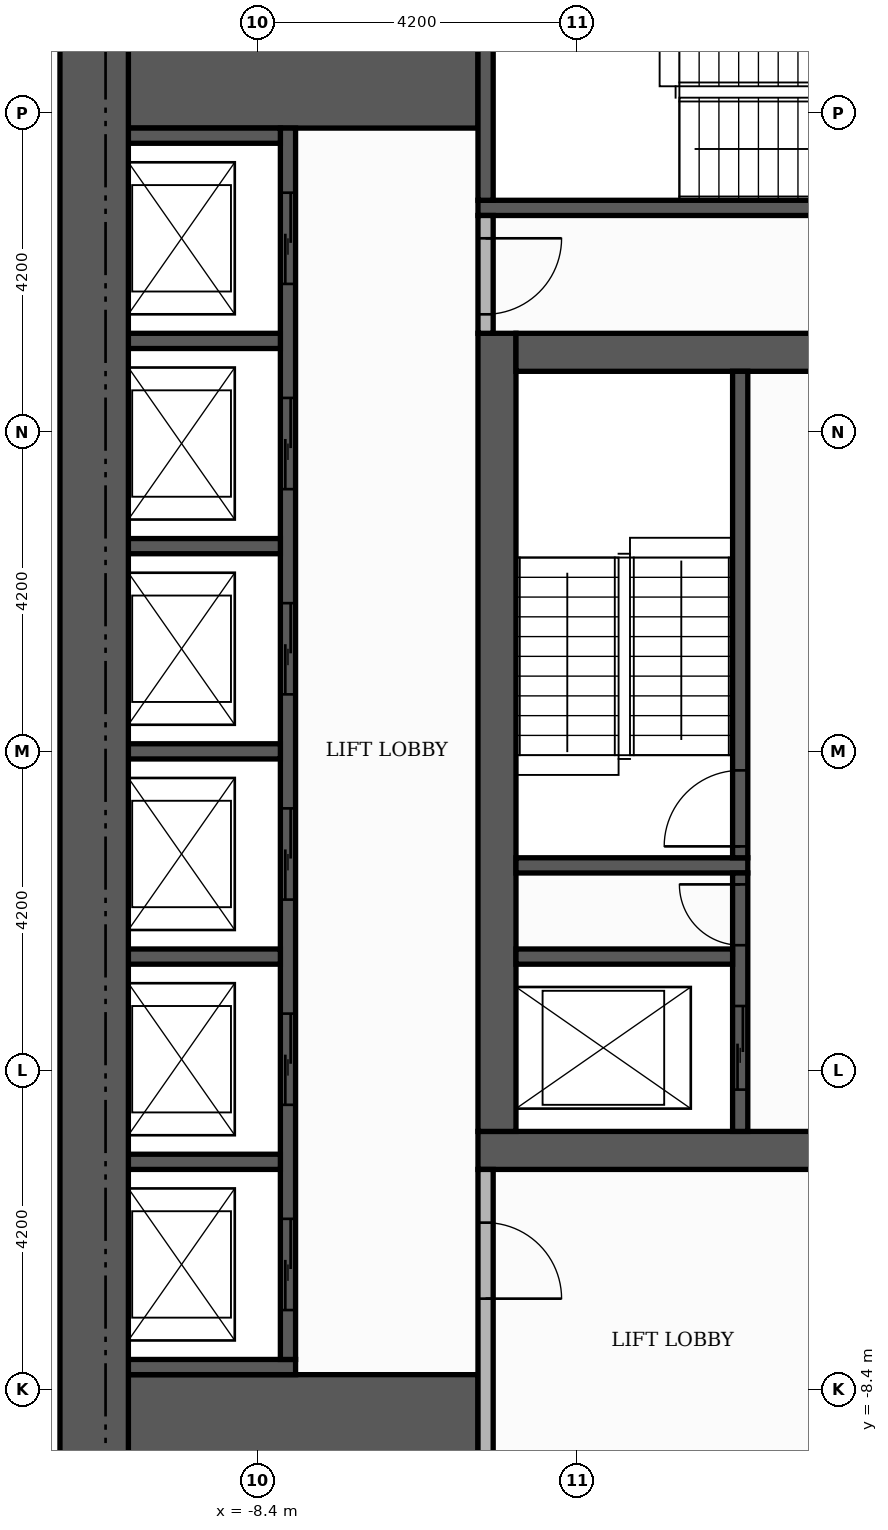
"""IFC4 building model, lengths in metres.
Left out: names, types, materials, properties, quantities, classifications, styles, units other than length and angle.
Written with IfcOpenShell. Run it as: python <this file> out.ifc"""

import sys

from ifc_helpers import new_model, si_unit, direction, frame, frame_2d, origin, place, context, subcontext, project, spatial, rectangle, extrude, element, fill, save


model = new_model("IFC4")
c1 = context("Model", 3, precision=1e-05, world=origin(), true_north=direction((0.0, 1.0)))
c2 = subcontext(c1, "Body", "Model", "MODEL_VIEW")
j1 = project(units=[si_unit("LENGTHUNIT", "METRE"), si_unit("PLANEANGLEUNIT", "RADIAN")], contexts=[c1])
p1 = place(None, origin())
s1 = spatial("IfcSite", under=j1, at=p1, CompositionType="ELEMENT")
p2 = place(p1, origin())
s2 = spatial("IfcBuilding", under=s1, at=p2, CompositionType="ELEMENT")
p3 = place(p2, frame((0.0, 0.0, 83.1)))
s3 = spatial("IfcBuildingStorey", under=s2, at=p3, CompositionType="ELEMENT", Elevation=83.1)
p4 = place(p3, frame((-5.5, -5.25, 0.0), z_axis=(0.0, 0.0, 1.0), x_axis=(1.0, 0.0, 0.0)))
e1 = element("IfcWall", 1, at=p4, inside=s3, PredefinedType="SHEAR", context=c2, shape_type="SweptSolid", body=[
    extrude(rectangle(XDim=11.0, YDim=0.5, at=frame_2d((5.5, 0.0))), origin(), (0.0, 0.0, 1.0), 3.48),
])
p5 = place(p4, frame((4.9, 0.0, 0.0)))
e2 = element("IfcOpeningElement", 2, at=p5, cuts=e1, PredefinedType="OPENING", context=c2, shape_type="SweptSolid", body=[
    extrude(rectangle(XDim=1.2, YDim=2.1, at=frame_2d((0.6, 1.05))), frame((0.0, 0.26, 0.0), z_axis=(0.0, -1.0, 0.0), x_axis=(1.0, 0.0, 0.0)), (0.0, 0.0, 1.0), 0.52),
])
p6 = place(p3, frame((-5.25, -5.0, 0.0), z_axis=(0.0, 0.0, 1.0), x_axis=(0.0, 1.0, 0.0)))
e3 = element("IfcWall", 3, at=p6, inside=s3, PredefinedType="SHEAR", context=c2, shape_type="SweptSolid", body=[
    extrude(rectangle(XDim=10.5, YDim=0.5, at=frame_2d((5.25, 0.0))), origin(), (0.0, 0.0, 1.0), 3.48),
])
p7 = place(p3, frame((-5.0, 5.25, 0.0), z_axis=(0.0, 0.0, 1.0), x_axis=(1.0, 0.0, 0.0)))
e4 = element("IfcWall", 4, at=p7, inside=s3, PredefinedType="SHEAR", context=c2, shape_type="SweptSolid", body=[
    extrude(rectangle(XDim=10.0, YDim=0.5, at=frame_2d((5.0, 0.0))), origin(), (0.0, 0.0, 1.0), 3.48),
])
p8 = place(p7, frame((4.4, 0.0, 0.0)))
e5 = element("IfcOpeningElement", 5, at=p8, cuts=e4, PredefinedType="OPENING", context=c2, shape_type="SweptSolid", body=[
    extrude(rectangle(XDim=1.2, YDim=2.1, at=frame_2d((0.6, 1.05))), frame((0.0, 0.26, 0.0), z_axis=(0.0, -1.0, 0.0), x_axis=(1.0, 0.0, 0.0)), (0.0, 0.0, 1.0), 0.52),
])
for number, where, z_axis, x_axis in (
    (6, (-10.1, -9.15, 0.0), (0.0, 0.0, 1.0), (1.0, 0.0, 0.0)),
    (7, (-10.1, 9.15, 0.0), (0.0, 0.0, 1.0), (1.0, 0.0, 0.0)),
):
    element("IfcWall", number, at=place(p3, frame(where, z_axis=z_axis, x_axis=x_axis)), inside=s3, PredefinedType="SHEAR", context=c2, shape_type="SweptSolid", body=[
        extrude(rectangle(XDim=4.6, YDim=1.9, at=frame_2d((2.3, 0.0))), origin(), (0.0, 0.0, 1.0), 3.48),
    ])
p9 = place(p3, frame((-5.0, -1.5, 0.0), z_axis=(0.0, 0.0, 1.0), x_axis=(1.0, 0.0, 0.0)))
e8 = element("IfcWall", 8, at=p9, inside=s3, PredefinedType="SHEAR", context=c2, shape_type="SweptSolid", body=[
    extrude(rectangle(XDim=3.05, YDim=0.2, at=frame_2d((1.525, 0.0))), origin(), (0.0, 0.0, 1.0), 3.48),
])
p10 = place(p3, frame((-2.05, -1.4, 0.0), z_axis=(0.0, 0.0, 1.0), x_axis=(0.0, 1.0, 0.0)))
e9 = element("IfcWall", 9, at=p10, inside=s3, PredefinedType="SHEAR", context=c2, shape_type="SweptSolid", body=[
    extrude(rectangle(XDim=6.4, YDim=0.2, at=frame_2d((3.2, 0.0))), origin(), (0.0, 0.0, 1.0), 3.48),
])
p11 = place(p10, frame((0.15, 0.0, 0.0)))
e10 = element("IfcOpeningElement", 10, at=p11, cuts=e9, PredefinedType="OPENING", context=c2, shape_type="SweptSolid", body=[
    extrude(rectangle(XDim=1.0, YDim=2.1, at=frame_2d((0.5, 1.05))), frame((0.0, 0.11, 0.0), z_axis=(0.0, -1.0, 0.0), x_axis=(1.0, 0.0, 0.0)), (0.0, 0.0, 1.0), 0.22),
])
p12 = place(p3, frame((-5.5, 7.15, 0.0), z_axis=(0.0, 0.0, 1.0), x_axis=(1.0, 0.0, 0.0)))
e11 = element("IfcWall", 11, at=p12, inside=s3, PredefinedType="SHEAR", context=c2, shape_type="SweptSolid", body=[
    extrude(rectangle(XDim=6.8, YDim=0.2, at=frame_2d((3.4, 0.0))), origin(), (0.0, 0.0, 1.0), 3.48),
])
p13 = place(p3, frame((-5.4, 7.25, 0.0), z_axis=(0.0, 0.0, 1.0), x_axis=(0.0, 1.0, 0.0)))
e12 = element("IfcWall", 12, at=p13, inside=s3, PredefinedType="SHEAR", context=c2, shape_type="SweptSolid", body=[
    extrude(rectangle(XDim=2.85, YDim=0.2, at=frame_2d((1.425, 0.0))), origin(), (0.0, 0.0, 1.0), 3.48),
])
p14 = place(p3, frame((-10.1, -8.1, 0.0), z_axis=(0.0, 0.0, 1.0), x_axis=(1.0, 0.0, 0.0)))
e13 = element("IfcWall", 13, at=p14, inside=s3, PredefinedType="SHEAR", context=c2, shape_type="SweptSolid", body=[
    extrude(rectangle(XDim=2.2, YDim=0.2, at=frame_2d((1.1, 0.0))), origin(), (0.0, 0.0, 1.0), 3.48),
])
p15 = place(p3, frame((-8.0, -8.0, 0.0), z_axis=(0.0, 0.0, 1.0), x_axis=(0.0, 1.0, 0.0)))
e14 = element("IfcWall", 14, at=p15, inside=s3, PredefinedType="SHEAR", context=c2, shape_type="SweptSolid", body=[
    extrude(rectangle(XDim=16.2, YDim=0.2, at=frame_2d((8.1, 0.0))), origin(), (0.0, 0.0, 1.0), 3.48),
])
p16 = place(p15, frame((0.65, 0.0, 0.0)))
e15 = element("IfcOpeningElement", 15, at=p16, cuts=e14, PredefinedType="OPENING", context=c2, shape_type="SweptSolid", body=[
    extrude(rectangle(XDim=1.2, YDim=2.1, at=frame_2d((0.6, 1.05))), frame((0.0, 0.11, 0.0), z_axis=(0.0, -1.0, 0.0), x_axis=(1.0, 0.0, 0.0)), (0.0, 0.0, 1.0), 0.22),
])
p17 = place(p15, frame((3.35, 0.0, 0.0)))
e16 = element("IfcOpeningElement", 16, at=p17, cuts=e14, PredefinedType="OPENING", context=c2, shape_type="SweptSolid", body=[
    extrude(rectangle(XDim=1.2, YDim=2.1, at=frame_2d((0.6, 1.05))), frame((0.0, 0.11, 0.0), z_axis=(0.0, -1.0, 0.0), x_axis=(1.0, 0.0, 0.0)), (0.0, 0.0, 1.0), 0.22),
])
p18 = place(p15, frame((6.05, 0.0, 0.0)))
e17 = element("IfcOpeningElement", 17, at=p18, cuts=e14, PredefinedType="OPENING", context=c2, shape_type="SweptSolid", body=[
    extrude(rectangle(XDim=1.2, YDim=2.1, at=frame_2d((0.6, 1.05))), frame((0.0, 0.11, 0.0), z_axis=(0.0, -1.0, 0.0), x_axis=(1.0, 0.0, 0.0)), (0.0, 0.0, 1.0), 0.22),
])
p19 = place(p15, frame((8.75, 0.0, 0.0)))
e18 = element("IfcOpeningElement", 18, at=p19, cuts=e14, PredefinedType="OPENING", context=c2, shape_type="SweptSolid", body=[
    extrude(rectangle(XDim=1.2, YDim=2.1, at=frame_2d((0.6, 1.05))), frame((0.0, 0.11, 0.0), z_axis=(0.0, -1.0, 0.0), x_axis=(1.0, 0.0, 0.0)), (0.0, 0.0, 1.0), 0.22),
])
p20 = place(p15, frame((11.45, 0.0, 0.0)))
e19 = element("IfcOpeningElement", 19, at=p20, cuts=e14, PredefinedType="OPENING", context=c2, shape_type="SweptSolid", body=[
    extrude(rectangle(XDim=1.2, YDim=2.1, at=frame_2d((0.6, 1.05))), frame((0.0, 0.11, 0.0), z_axis=(0.0, -1.0, 0.0), x_axis=(1.0, 0.0, 0.0)), (0.0, 0.0, 1.0), 0.22),
])
p21 = place(p15, frame((14.15, 0.0, 0.0)))
e20 = element("IfcOpeningElement", 20, at=p21, cuts=e14, PredefinedType="OPENING", context=c2, shape_type="SweptSolid", body=[
    extrude(rectangle(XDim=1.2, YDim=2.1, at=frame_2d((0.6, 1.05))), frame((0.0, 0.11, 0.0), z_axis=(0.0, -1.0, 0.0), x_axis=(1.0, 0.0, 0.0)), (0.0, 0.0, 1.0), 0.22),
])
p22 = place(p3, frame((-10.1, -5.4, 0.0), z_axis=(0.0, 0.0, 1.0), x_axis=(1.0, 0.0, 0.0)))
e21 = element("IfcWall", 21, at=p22, inside=s3, PredefinedType="SHEAR", context=c2, shape_type="SweptSolid", body=[
    extrude(rectangle(XDim=2.0, YDim=0.2, at=frame_2d((1.0, 0.0))), origin(), (0.0, 0.0, 1.0), 3.48),
])
p23 = place(p3, frame((-2.05, -5.0, 0.0), z_axis=(0.0, 0.0, 1.0), x_axis=(0.0, 1.0, 0.0)))
e22 = element("IfcWall", 22, at=p23, inside=s3, PredefinedType="SHEAR", context=c2, shape_type="SweptSolid", body=[
    extrude(rectangle(XDim=3.4, YDim=0.2, at=frame_2d((1.7, 0.0))), origin(), (0.0, 0.0, 1.0), 3.48),
])
p24 = place(p23, frame((0.55, 0.0, 0.0)))
e23 = element("IfcOpeningElement", 23, at=p24, cuts=e22, PredefinedType="OPENING", context=c2, shape_type="SweptSolid", body=[
    extrude(rectangle(XDim=1.1, YDim=2.1, at=frame_2d((0.55, 1.05))), frame((0.0, 0.11, 0.0), z_axis=(0.0, -1.0, 0.0), x_axis=(1.0, 0.0, 0.0)), (0.0, 0.0, 1.0), 0.22),
])
p25 = place(p23, frame((2.45, 0.0, 0.0)))
e24 = element("IfcOpeningElement", 24, at=p25, cuts=e22, PredefinedType="OPENING", context=c2, shape_type="SweptSolid", body=[
    extrude(rectangle(XDim=0.8, YDim=2.1, at=frame_2d((0.4, 1.05))), frame((0.0, 0.11, 0.0), z_axis=(0.0, -1.0, 0.0), x_axis=(1.0, 0.0, 0.0)), (0.0, 0.0, 1.0), 0.22),
])
p26 = place(p3, frame((-10.1, -2.7, 0.0), z_axis=(0.0, 0.0, 1.0), x_axis=(1.0, 0.0, 0.0)))
e25 = element("IfcWall", 25, at=p26, inside=s3, PredefinedType="SHEAR", context=c2, shape_type="SweptSolid", body=[
    extrude(rectangle(XDim=2.0, YDim=0.2, at=frame_2d((1.0, 0.0))), origin(), (0.0, 0.0, 1.0), 3.48),
])
p27 = place(p3, frame((-5.0, -2.7, 0.0), z_axis=(0.0, 0.0, 1.0), x_axis=(1.0, 0.0, 0.0)))
e26 = element("IfcWall", 26, at=p27, inside=s3, PredefinedType="SHEAR", context=c2, shape_type="SweptSolid", body=[
    extrude(rectangle(XDim=2.85, YDim=0.2, at=frame_2d((1.425, 0.0))), origin(), (0.0, 0.0, 1.0), 3.48),
])
for number, where, z_axis, x_axis in (
    (27, (-10.1, 0.0, 0.0), (0.0, 0.0, 1.0), (1.0, 0.0, 0.0)),
    (28, (-10.1, 2.7, 0.0), (0.0, 0.0, 1.0), (1.0, 0.0, 0.0)),
    (29, (-10.1, 5.4, 0.0), (0.0, 0.0, 1.0), (1.0, 0.0, 0.0)),
    (30, (-10.1, 8.1, 0.0), (0.0, 0.0, 1.0), (1.0, 0.0, 0.0)),
):
    element("IfcWall", number, at=place(p3, frame(where, z_axis=z_axis, x_axis=x_axis)), inside=s3, PredefinedType="SHEAR", context=c2, shape_type="SweptSolid", body=[
        extrude(rectangle(XDim=2.0, YDim=0.2, at=frame_2d((1.0, 0.0))), origin(), (0.0, 0.0, 1.0), 3.48),
    ])
p28 = place(p3, frame((-10.55, -10.1, 0.0), z_axis=(0.0, 0.0, 1.0), x_axis=(0.0, 1.0, 0.0)))
e31 = element("IfcWall", 31, at=p28, inside=s3, PredefinedType="SHEAR", context=c2, shape_type="SweptSolid", body=[
    extrude(rectangle(XDim=20.2, YDim=0.9, at=frame_2d((10.1, 0.0))), origin(), (0.0, 0.0, 1.0), 3.48),
])
p29 = place(p3, frame((-5.4, -10.1, 0.0), z_axis=(0.0, 0.0, 1.0), x_axis=(0.0, 1.0, 0.0)))
e32 = element("IfcWall", 32, at=p29, inside=s3, PredefinedType="PARTITIONING", context=c2, shape_type="SweptSolid", body=[
    extrude(rectangle(XDim=4.6, YDim=0.2, at=frame_2d((2.3, 0.0))), origin(), (0.0, 0.0, 1.0), 3.48),
])
p30 = place(p29, frame((2.9, 0.0, 0.0)))
e33 = element("IfcOpeningElement", 33, at=p30, cuts=e32, PredefinedType="OPENING", context=c2, shape_type="SweptSolid", body=[
    extrude(rectangle(XDim=1.0, YDim=2.1, at=frame_2d((0.5, 1.05))), frame((0.0, 0.11, 0.0), z_axis=(0.0, -1.0, 0.0), x_axis=(1.0, 0.0, 0.0)), (0.0, 0.0, 1.0), 0.22),
])
p31 = place(p3, frame((-5.4, 5.5, 0.0), z_axis=(0.0, 0.0, 1.0), x_axis=(0.0, 1.0, 0.0)))
e34 = element("IfcWall", 34, at=p31, inside=s3, PredefinedType="PARTITIONING", context=c2, shape_type="SweptSolid", body=[
    extrude(rectangle(XDim=1.55, YDim=0.2, at=frame_2d((0.775, 0.0))), origin(), (0.0, 0.0, 1.0), 3.48),
])
p32 = place(p31, frame((0.25, 0.0, 0.0)))
e35 = element("IfcOpeningElement", 35, at=p32, cuts=e34, PredefinedType="OPENING", context=c2, shape_type="SweptSolid", body=[
    extrude(rectangle(XDim=1.0, YDim=2.1, at=frame_2d((0.5, 1.05))), frame((0.0, 0.11, 0.0), z_axis=(0.0, -1.0, 0.0), x_axis=(1.0, 0.0, 0.0)), (0.0, 0.0, 1.0), 0.22),
])
p33 = place(p16, origin())
e36 = element("IfcDoor", 36, at=p33, inside=s3, OperationType="SLIDING_TO_LEFT", PredefinedType="DOOR", context=c2, shape_type="SweptSolid", body=[
    extrude(rectangle(XDim=1.2, YDim=2.1, at=frame_2d((0.6, 1.05))), frame((0.0, 0.025, 0.0), z_axis=(0.0, -1.0, 0.0), x_axis=(1.0, 0.0, 0.0)), (0.0, 0.0, 1.0), 0.05),
])
fill(e15, e36)
p34 = place(p17, origin())
e37 = element("IfcDoor", 37, at=p34, inside=s3, OperationType="SLIDING_TO_LEFT", PredefinedType="DOOR", context=c2, shape_type="SweptSolid", body=[
    extrude(rectangle(XDim=1.2, YDim=2.1, at=frame_2d((0.6, 1.05))), frame((0.0, 0.025, 0.0), z_axis=(0.0, -1.0, 0.0), x_axis=(1.0, 0.0, 0.0)), (0.0, 0.0, 1.0), 0.05),
])
fill(e16, e37)
p35 = place(p18, origin())
e38 = element("IfcDoor", 38, at=p35, inside=s3, OperationType="SLIDING_TO_LEFT", PredefinedType="DOOR", context=c2, shape_type="SweptSolid", body=[
    extrude(rectangle(XDim=1.2, YDim=2.1, at=frame_2d((0.6, 1.05))), frame((0.0, 0.025, 0.0), z_axis=(0.0, -1.0, 0.0), x_axis=(1.0, 0.0, 0.0)), (0.0, 0.0, 1.0), 0.05),
])
fill(e17, e38)
p36 = place(p19, origin())
e39 = element("IfcDoor", 39, at=p36, inside=s3, OperationType="SLIDING_TO_LEFT", PredefinedType="DOOR", context=c2, shape_type="SweptSolid", body=[
    extrude(rectangle(XDim=1.2, YDim=2.1, at=frame_2d((0.6, 1.05))), frame((0.0, 0.025, 0.0), z_axis=(0.0, -1.0, 0.0), x_axis=(1.0, 0.0, 0.0)), (0.0, 0.0, 1.0), 0.05),
])
fill(e18, e39)
p37 = place(p20, origin())
e40 = element("IfcDoor", 40, at=p37, inside=s3, OperationType="SLIDING_TO_LEFT", PredefinedType="DOOR", context=c2, shape_type="SweptSolid", body=[
    extrude(rectangle(XDim=1.2, YDim=2.1, at=frame_2d((0.6, 1.05))), frame((0.0, 0.025, 0.0), z_axis=(0.0, -1.0, 0.0), x_axis=(1.0, 0.0, 0.0)), (0.0, 0.0, 1.0), 0.05),
])
fill(e19, e40)
p38 = place(p21, origin())
e41 = element("IfcDoor", 41, at=p38, inside=s3, OperationType="SLIDING_TO_LEFT", PredefinedType="DOOR", context=c2, shape_type="SweptSolid", body=[
    extrude(rectangle(XDim=1.2, YDim=2.1, at=frame_2d((0.6, 1.05))), frame((0.0, 0.025, 0.0), z_axis=(0.0, -1.0, 0.0), x_axis=(1.0, 0.0, 0.0)), (0.0, 0.0, 1.0), 0.05),
])
fill(e20, e41)
p39 = place(p24, origin())
e42 = element("IfcDoor", 42, at=p39, inside=s3, OperationType="SLIDING_TO_LEFT", PredefinedType="DOOR", context=c2, shape_type="SweptSolid", body=[
    extrude(rectangle(XDim=1.1, YDim=2.1, at=frame_2d((0.55, 1.05))), frame((0.0, 0.025, 0.0), z_axis=(0.0, -1.0, 0.0), x_axis=(1.0, 0.0, 0.0)), (0.0, 0.0, 1.0), 0.05),
])
fill(e23, e42)
p40 = place(p11, origin())
e43 = element("IfcDoor", 43, at=p40, inside=s3, OperationType="SINGLE_SWING_LEFT", PredefinedType="DOOR", context=c2, shape_type="SweptSolid", body=[
    extrude(rectangle(XDim=1.0, YDim=2.1, at=frame_2d((0.5, 1.05))), frame((0.0, 0.025, 0.0), z_axis=(0.0, -1.0, 0.0), x_axis=(1.0, 0.0, 0.0)), (0.0, 0.0, 1.0), 0.05),
])
fill(e10, e43)
p41 = place(p25, origin())
e44 = element("IfcDoor", 44, at=p41, inside=s3, OperationType="SINGLE_SWING_RIGHT", PredefinedType="DOOR", context=c2, shape_type="SweptSolid", body=[
    extrude(rectangle(XDim=0.8, YDim=2.1, at=frame_2d((0.4, 1.05))), frame((0.0, 0.025, 0.0), z_axis=(0.0, -1.0, 0.0), x_axis=(1.0, 0.0, 0.0)), (0.0, 0.0, 1.0), 0.05),
])
fill(e24, e44)
p42 = place(p32, frame((1.0, 0.0, 0.0), z_axis=(0.0, 0.0, 1.0), x_axis=(-1.0, 0.0, 0.0)))
e45 = element("IfcDoor", 45, at=p42, inside=s3, OperationType="SINGLE_SWING_RIGHT", PredefinedType="DOOR", context=c2, shape_type="SweptSolid", body=[
    extrude(rectangle(XDim=1.0, YDim=2.1, at=frame_2d((0.5, 1.05))), frame((0.0, 0.025, 0.0), z_axis=(0.0, -1.0, 0.0), x_axis=(1.0, 0.0, 0.0)), (0.0, 0.0, 1.0), 0.05),
])
fill(e35, e45)
p43 = place(p30, frame((1.0, 0.0, 0.0), z_axis=(0.0, 0.0, 1.0), x_axis=(-1.0, 0.0, 0.0)))
e46 = element("IfcDoor", 46, at=p43, inside=s3, OperationType="SINGLE_SWING_LEFT", PredefinedType="DOOR", context=c2, shape_type="SweptSolid", body=[
    extrude(rectangle(XDim=1.0, YDim=2.1, at=frame_2d((0.5, 1.05))), frame((0.0, 0.025, 0.0), z_axis=(0.0, -1.0, 0.0), x_axis=(1.0, 0.0, 0.0)), (0.0, 0.0, 1.0), 0.05),
])
fill(e33, e46)
save(model, sys.argv[1])
